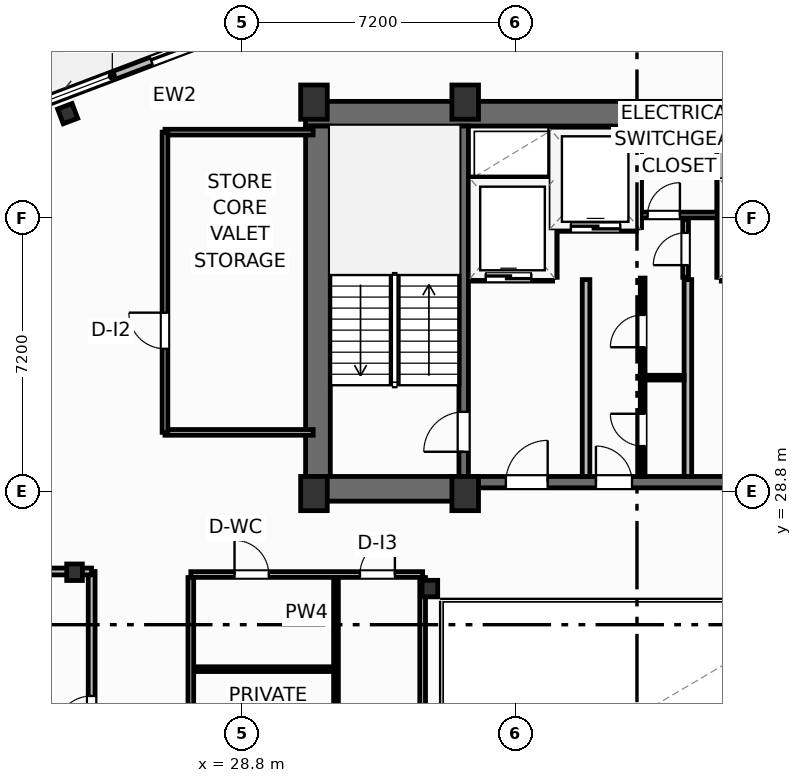
"""IFC4 building model, lengths in metres.
Left out: names, types, materials, properties, quantities, classifications, styles, units other than length and angle.
Written with IfcOpenShell. Run it as: python <this file> out.ifc"""

import sys

from ifc_helpers import new_model, si_unit, direction, frame, frame_2d, origin, origin_2d, place, context, subcontext, project, spatial, rectangle, i_section, extrude, element, fill, save


model = new_model("IFC4")
c1 = context("Model", 3, precision=1e-05, world=origin(), true_north=direction((0.0, 1.0)))
c2 = subcontext(c1, "Body", "Model", "MODEL_VIEW")
j1 = project(units=[si_unit("LENGTHUNIT", "METRE"), si_unit("PLANEANGLEUNIT", "RADIAN")], contexts=[c1])
p1 = place(None, origin())
s1 = spatial("IfcSite", under=j1, at=p1, CompositionType="ELEMENT")
p2 = place(p1, origin())
s2 = spatial("IfcBuilding", under=s1, at=p2, CompositionType="ELEMENT")
p3 = place(p2, frame((0.0, 0.0, 212.7)))
s3 = spatial("IfcBuildingStorey", under=s2, at=p3, CompositionType="ELEMENT", Elevation=212.7)
for number, where, z_axis, x_axis in (
    (1, (30.7, 28.75, 0.0), (0.0, 0.0, 1.0), (1.0, 0.0, 0.0)),
    (2, (34.68, 28.75, 0.0), (0.0, 0.0, 1.0), (1.0, 0.0, 0.0)),
    (3, (30.7, 39.05, 0.0), (0.0, 0.0, 1.0), (1.0, 0.0, 0.0)),
    (4, (34.68, 39.05, 0.0), (0.0, 0.0, 1.0), (1.0, 0.0, 0.0)),
):
    element("IfcColumn", number, at=place(p3, frame(where, z_axis=z_axis, x_axis=x_axis)), inside=s3, PredefinedType="COLUMN", context=c2, shape_type="SweptSolid", body=[
        extrude(rectangle(XDim=0.7, YDim=0.9, at=origin_2d()), origin(), (0.0, 0.0, 1.0), 3.7),
    ])
for number, where, z_axis, x_axis in (
    (5, (33.75, 26.25, 0.0), (0.0, 0.0, 1.0), (1.0, 0.0, 0.0)),
    (6, (24.4, 26.68, 0.0), (0.0, 0.0, 1.0), (1.0, 0.0, 0.0)),
):
    element("IfcColumn", number, at=place(p3, frame(where, z_axis=z_axis, x_axis=x_axis)), inside=s3, PredefinedType="COLUMN", context=c2, shape_type="SweptSolid", body=[
        extrude(i_section(OverallWidth=0.412, OverallDepth=0.435, WebThickness=0.036, FlangeThickness=0.057, FilletRadius=0.025, at=origin_2d()), origin(), (0.0, 0.0, 1.0), 3.7),
    ])
p4 = place(p3, frame((30.48, 38.745, 0.0), z_axis=(0.0, 0.0, 1.0), x_axis=(1.0, 0.0, 0.0)))
e7 = element("IfcWall", 7, at=p4, inside=s3, PredefinedType="SHEAR", context=c2, shape_type="SweptSolid", body=[
    extrude(rectangle(XDim=17.44, YDim=0.65, at=frame_2d((8.72, 0.0))), origin(), (0.0, 0.0, 1.0), 3.45),
])
p5 = place(p3, frame((30.805, 29.2, 0.0), z_axis=(0.0, 0.0, 1.0), x_axis=(0.0, 1.0, 0.0)))
e8 = element("IfcWall", 8, at=p5, inside=s3, PredefinedType="SHEAR", context=c2, shape_type="SweptSolid", body=[
    extrude(rectangle(XDim=9.22, YDim=0.65, at=frame_2d((4.61, 0.0))), origin(), (0.0, 0.0, 1.0), 3.45),
])
p6 = place(p3, frame((30.48, 28.875, 0.0), z_axis=(0.0, 0.0, 1.0), x_axis=(1.0, 0.0, 0.0)))
e9 = element("IfcWall", 9, at=p6, inside=s3, PredefinedType="SHEAR", context=c2, shape_type="SweptSolid", body=[
    extrude(rectangle(XDim=4.32, YDim=0.65, at=frame_2d((2.16, 0.0))), origin(), (0.0, 0.0, 1.0), 3.45),
])
p7 = place(p3, frame((34.8, 29.05, 0.0), z_axis=(0.0, 0.0, 1.0), x_axis=(1.0, 0.0, 0.0)))
e10 = element("IfcWall", 10, at=p7, inside=s3, PredefinedType="SHEAR", context=c2, shape_type="SweptSolid", body=[
    extrude(rectangle(XDim=8.8, YDim=0.3, at=frame_2d((4.4, 0.0))), origin(), (0.0, 0.0, 1.0), 3.45),
])
p8 = place(p7, frame((0.95, 0.0, 0.0)))
e11 = element("IfcOpeningElement", 11, at=p8, cuts=e10, PredefinedType="OPENING", context=c2, shape_type="SweptSolid", body=[
    extrude(rectangle(XDim=1.1, YDim=2.15, at=frame_2d((0.55, 1.075))), frame((0.0, 0.16, 0.0), z_axis=(0.0, -1.0, 0.0), x_axis=(1.0, 0.0, 0.0)), (0.0, 0.0, 1.0), 0.32),
])
p9 = place(p7, frame((6.75, 0.0, 0.0)))
e12 = element("IfcOpeningElement", 12, at=p9, cuts=e10, PredefinedType="OPENING", context=c2, shape_type="SweptSolid", body=[
    extrude(rectangle(XDim=1.1, YDim=2.15, at=frame_2d((0.55, 1.075))), frame((0.0, 0.16, 0.0), z_axis=(0.0, -1.0, 0.0), x_axis=(1.0, 0.0, 0.0)), (0.0, 0.0, 1.0), 0.32),
])
p10 = place(p7, frame((3.32, 0.0, 0.0)))
e13 = element("IfcOpeningElement", 13, at=p10, cuts=e10, PredefinedType="OPENING", context=c2, shape_type="SweptSolid", body=[
    extrude(rectangle(XDim=0.95, YDim=2.15, at=frame_2d((0.475, 1.075))), frame((0.0, 0.16, 0.0), z_axis=(0.0, -1.0, 0.0), x_axis=(1.0, 0.0, 0.0)), (0.0, 0.0, 1.0), 0.32),
])
p11 = place(p3, frame((34.64, 29.2, 0.0), z_axis=(0.0, 0.0, 1.0), x_axis=(0.0, 1.0, 0.0)))
e14 = element("IfcWall", 14, at=p11, inside=s3, PredefinedType="SHEAR", context=c2, shape_type="SweptSolid", body=[
    extrude(rectangle(XDim=9.22, YDim=0.25, at=frame_2d((4.61, 0.0))), origin(), (0.0, 0.0, 1.0), 3.45),
])
p12 = place(p11, frame((0.65, 0.0, 0.0)))
e15 = element("IfcOpeningElement", 15, at=p12, cuts=e14, PredefinedType="OPENING", context=c2, shape_type="SweptSolid", body=[
    extrude(rectangle(XDim=1.05, YDim=2.15, at=frame_2d((0.525, 1.075))), frame((0.0, 0.135, 0.0), z_axis=(0.0, -1.0, 0.0), x_axis=(1.0, 0.0, 0.0)), (0.0, 0.0, 1.0), 0.27),
])
p13 = place(p3, frame((24.219, 38.747, 0.0), z_axis=(0.0, 0.0, 1.0), x_axis=(0.935221751401, 0.354062530786, 0.0)))
e16 = element("IfcColumn", 16, at=p13, inside=s3, PredefinedType="COLUMN", context=c2, shape_type="SweptSolid", body=[
    extrude(i_section(OverallWidth=0.406, OverallDepth=0.416, WebThickness=0.03, FlangeThickness=0.048, FilletRadius=0.025, at=origin_2d()), origin(), (0.0, 0.0, 1.0), 3.7),
])
p14 = place(p3, frame((23.149, 38.887, 0.0), z_axis=(0.0, 0.0, 1.0), x_axis=(0.9352192676, 0.354069091436, 0.0)))
e17 = element("IfcWall", 17, at=p14, inside=s3, PredefinedType="SOLIDWALL", context=c2, shape_type="SweptSolid", body=[
    extrude(rectangle(XDim=6.0, YDim=0.22, at=frame_2d((3.0, 0.0))), origin(), (0.0, 0.0, 1.0), 2.73),
])
p15 = place(p14, frame((3.5, 0.0, 0.0)))
e18 = element("IfcOpeningElement", 18, at=p15, cuts=e17, PredefinedType="OPENING", context=c2, shape_type="SweptSolid", body=[
    extrude(rectangle(XDim=2.1, YDim=2.3, at=frame_2d((1.05, 1.15))), frame((0.0, 0.12, 0.0), z_axis=(0.0, -1.0, 0.0), x_axis=(1.0, 0.0, 0.0)), (0.0, 0.0, 1.0), 0.24),
])
p16 = place(p14, frame((0.55, 0.0, 0.75)))
e19 = element("IfcOpeningElement", 19, at=p16, cuts=e17, PredefinedType="OPENING", context=c2, shape_type="SweptSolid", body=[
    extrude(rectangle(XDim=1.85, YDim=1.75, at=frame_2d((0.925, 0.875))), frame((0.0, 0.12, 0.0), z_axis=(0.0, -1.0, 0.0), x_axis=(1.0, 0.0, 0.0)), (0.0, 0.0, 1.0), 0.24),
])
p17 = place(p3, frame((24.85, 19.2, 0.0), z_axis=(0.0, 0.0, 1.0), x_axis=(0.0, 1.0, 0.0)))
e20 = element("IfcWall", 20, at=p17, inside=s3, PredefinedType="PARTITIONING", context=c2, shape_type="SweptSolid", body=[
    extrude(rectangle(XDim=7.5, YDim=0.18, at=frame_2d((3.75, 0.0))), origin(), (0.0, 0.0, 1.0), 3.45),
])
p18 = place(p17, frame((3.275, 0.0, 0.0)))
e21 = element("IfcOpeningElement", 21, at=p18, cuts=e20, PredefinedType="OPENING", context=c2, shape_type="SweptSolid", body=[
    extrude(rectangle(XDim=0.95, YDim=2.05, at=frame_2d((0.475, 1.025))), frame((0.0, 0.1, 0.0), z_axis=(0.0, -1.0, 0.0), x_axis=(1.0, 0.0, 0.0)), (0.0, 0.0, 1.0), 0.2),
])
p19 = place(p3, frame((3.467, 26.7, 0.0), z_axis=(0.0, 0.0, 1.0), x_axis=(1.0, 0.0, 0.0)))
e22 = element("IfcWall", 22, at=p19, inside=s3, PredefinedType="PARTITIONING", context=c2, shape_type="SweptSolid", body=[
    extrude(rectangle(XDim=21.383, YDim=0.18, at=frame_2d((10.691, 0.0))), origin(), (0.0, 0.0, 1.0), 2.662),
])
for number, where, z_axis, x_axis in (
    (23, (37.86, 29.2, 0.0), (0.0, 0.0, 1.0), (0.0, 1.0, 0.0)),
    (24, (40.54, 29.2, 0.0), (0.0, 0.0, 1.0), (0.0, 1.0, 0.0)),
):
    element("IfcWall", number, at=place(p3, frame(where, z_axis=z_axis, x_axis=x_axis)), inside=s3, PredefinedType="PARTITIONING", context=c2, shape_type="SweptSolid", body=[
        extrude(rectangle(XDim=5.18, YDim=0.2, at=frame_2d((2.59, 0.0))), origin(), (0.0, 0.0, 1.0), 3.45),
    ])
p20 = place(p3, frame((34.8, 34.44, 0.0), z_axis=(0.0, 0.0, 1.0), x_axis=(1.0, 0.0, 0.0)))
e25 = element("IfcWall", 25, at=p20, inside=s3, PredefinedType="PARTITIONING", context=c2, shape_type="SweptSolid", body=[
    extrude(rectangle(XDim=2.18, YDim=0.2, at=frame_2d((1.09, 0.0))), origin(), (0.0, 0.0, 1.0), 3.45),
])
p21 = place(p20, frame((0.42, 0.0, 0.0)))
e26 = element("IfcOpeningElement", 26, at=p21, cuts=e25, PredefinedType="OPENING", context=c2, shape_type="SweptSolid", body=[
    extrude(rectangle(XDim=1.2, YDim=2.2, at=frame_2d((0.6, 1.1))), frame((0.0, 0.11, 0.0), z_axis=(0.0, -1.0, 0.0), x_axis=(1.0, 0.0, 0.0)), (0.0, 0.0, 1.0), 0.22),
])
p22 = place(p3, frame((34.8, 36.98, 0.0), z_axis=(0.0, 0.0, 1.0), x_axis=(1.0, 0.0, 0.0)))
e27 = element("IfcWall", 27, at=p22, inside=s3, PredefinedType="PARTITIONING", context=c2, shape_type="SweptSolid", body=[
    extrude(rectangle(XDim=2.18, YDim=0.2, at=frame_2d((1.09, 0.0))), origin(), (0.0, 0.0, 1.0), 3.45),
])
for number, where, z_axis, x_axis in (
    (28, (37.0, 34.44, 0.0), (0.0, 0.0, 1.0), (0.0, 1.0, 0.0)),
    (29, (41.4, 34.44, 0.0), (0.0, 0.0, 1.0), (0.0, 1.0, 0.0)),
):
    element("IfcWall", number, at=place(p3, frame(where, z_axis=z_axis, x_axis=x_axis)), inside=s3, PredefinedType="PARTITIONING", context=c2, shape_type="SweptSolid", body=[
        extrude(rectangle(XDim=3.9, YDim=0.2, at=frame_2d((1.95, 0.0))), origin(), (0.0, 0.0, 1.0), 3.45),
    ])
p23 = place(p3, frame((37.06, 35.75, 0.0), z_axis=(0.0, 0.0, 1.0), x_axis=(1.0, 0.0, 0.0)))
e30 = element("IfcWall", 30, at=p23, inside=s3, PredefinedType="PARTITIONING", context=c2, shape_type="SweptSolid", body=[
    extrude(rectangle(XDim=2.12, YDim=0.2, at=frame_2d((1.06, 0.0))), origin(), (0.0, 0.0, 1.0), 3.45),
])
p24 = place(p23, frame((0.4, 0.0, 0.0)))
e31 = element("IfcOpeningElement", 31, at=p24, cuts=e30, PredefinedType="OPENING", context=c2, shape_type="SweptSolid", body=[
    extrude(rectangle(XDim=1.3, YDim=2.2, at=frame_2d((0.65, 1.1))), frame((0.0, 0.11, 0.0), z_axis=(0.0, -1.0, 0.0), x_axis=(1.0, 0.0, 0.0)), (0.0, 0.0, 1.0), 0.22),
])
p25 = place(p3, frame((39.22, 35.75, 0.0), z_axis=(0.0, 0.0, 1.0), x_axis=(0.0, 1.0, 0.0)))
e32 = element("IfcWall", 32, at=p25, inside=s3, PredefinedType="PARTITIONING", context=c2, shape_type="SweptSolid", body=[
    extrude(rectangle(XDim=2.59, YDim=0.2, at=frame_2d((1.295, 0.0))), origin(), (0.0, 0.0, 1.0), 3.45),
])
p26 = place(p3, frame((39.3, 36.08, 0.0), z_axis=(0.0, 0.0, 1.0), x_axis=(1.0, 0.0, 0.0)))
e33 = element("IfcWall", 33, at=p26, inside=s3, PredefinedType="PARTITIONING", context=c2, shape_type="SweptSolid", body=[
    extrude(rectangle(XDim=2.02, YDim=0.15, at=frame_2d((1.01, 0.0))), origin(), (0.0, 0.0, 1.0), 3.45),
])
p27 = place(p26, frame((0.18, 0.0, 0.0)))
e34 = element("IfcOpeningElement", 34, at=p27, cuts=e33, PredefinedType="OPENING", context=c2, shape_type="SweptSolid", body=[
    extrude(rectangle(XDim=0.85, YDim=2.05, at=frame_2d((0.425, 1.025))), frame((0.0, 0.085, 0.0), z_axis=(0.0, -1.0, 0.0), x_axis=(1.0, 0.0, 0.0)), (0.0, 0.0, 1.0), 0.17),
])
p28 = place(p3, frame((40.48, 34.44, 0.0), z_axis=(0.0, 0.0, 1.0), x_axis=(0.0, 1.0, 0.0)))
e35 = element("IfcWall", 35, at=p28, inside=s3, PredefinedType="PARTITIONING", context=c2, shape_type="SweptSolid", body=[
    extrude(rectangle(XDim=1.52, YDim=0.15, at=frame_2d((0.76, 0.0))), origin(), (0.0, 0.0, 1.0), 3.45),
])
p29 = place(p28, frame((0.32, 0.0, 0.0)))
e36 = element("IfcOpeningElement", 36, at=p29, cuts=e35, PredefinedType="OPENING", context=c2, shape_type="SweptSolid", body=[
    extrude(rectangle(XDim=0.85, YDim=2.05, at=frame_2d((0.425, 1.025))), frame((0.0, 0.085, 0.0), z_axis=(0.0, -1.0, 0.0), x_axis=(1.0, 0.0, 0.0)), (0.0, 0.0, 1.0), 0.17),
])
p30 = place(p3, frame((39.35, 31.8, 0.0), z_axis=(0.0, 0.0, 1.0), x_axis=(1.0, 0.0, 0.0)))
e37 = element("IfcWall", 37, at=p30, inside=s3, PredefinedType="PARTITIONING", context=c2, shape_type="SweptSolid", body=[
    extrude(rectangle(XDim=1.09, YDim=0.125, at=frame_2d((0.545, 0.0))), origin(), (0.0, 0.0, 1.0), 3.45),
])
p31 = place(p3, frame((39.35, 29.2, 0.0), z_axis=(0.0, 0.0, 1.0), x_axis=(0.0, 1.0, 0.0)))
e38 = element("IfcWall", 38, at=p31, inside=s3, PredefinedType="PARTITIONING", context=c2, shape_type="SweptSolid", body=[
    extrude(rectangle(XDim=5.22, YDim=0.125, at=frame_2d((2.61, 0.0))), origin(), (0.0, 0.0, 1.0), 3.45),
])
p32 = place(p31, frame((0.8, 0.0, 0.0)))
e39 = element("IfcOpeningElement", 39, at=p32, cuts=e38, PredefinedType="OPENING", context=c2, shape_type="SweptSolid", body=[
    extrude(rectangle(XDim=0.85, YDim=2.05, at=frame_2d((0.425, 1.025))), frame((0.0, 0.073, 0.0), z_axis=(0.0, -1.0, 0.0), x_axis=(1.0, 0.0, 0.0)), (0.0, 0.0, 1.0), 0.145),
])
p33 = place(p31, frame((3.4, 0.0, 0.0)))
e40 = element("IfcOpeningElement", 40, at=p33, cuts=e38, PredefinedType="OPENING", context=c2, shape_type="SweptSolid", body=[
    extrude(rectangle(XDim=0.85, YDim=2.05, at=frame_2d((0.425, 1.025))), frame((0.0, 0.073, 0.0), z_axis=(0.0, -1.0, 0.0), x_axis=(1.0, 0.0, 0.0)), (0.0, 0.0, 1.0), 0.145),
])
p34 = place(p3, frame((27.46, 26.62, 0.0), z_axis=(0.0, 0.0, 1.0), x_axis=(1.0, 0.0, 0.0)))
e41 = element("IfcWall", 41, at=p34, inside=s3, PredefinedType="PARTITIONING", context=c2, shape_type="SweptSolid", body=[
    extrude(rectangle(XDim=6.1, YDim=0.15, at=frame_2d((3.05, 0.0))), origin(), (0.0, 0.0, 1.0), 2.662),
])
p35 = place(p34, frame((1.15, 0.0, 0.0)))
e42 = element("IfcOpeningElement", 42, at=p35, cuts=e41, PredefinedType="OPENING", context=c2, shape_type="SweptSolid", body=[
    extrude(rectangle(XDim=0.9, YDim=2.05, at=frame_2d((0.45, 1.025))), frame((0.0, 0.085, 0.0), z_axis=(0.0, -1.0, 0.0), x_axis=(1.0, 0.0, 0.0)), (0.0, 0.0, 1.0), 0.17),
])
p36 = place(p34, frame((4.45, 0.0, 0.0)))
e43 = element("IfcOpeningElement", 43, at=p36, cuts=e41, PredefinedType="OPENING", context=c2, shape_type="SweptSolid", body=[
    extrude(rectangle(XDim=0.92, YDim=2.05, at=frame_2d((0.46, 1.025))), frame((0.0, 0.085, 0.0), z_axis=(0.0, -1.0, 0.0), x_axis=(1.0, 0.0, 0.0)), (0.0, 0.0, 1.0), 0.17),
])
p37 = place(p3, frame((31.28, 19.38, 0.0), z_axis=(0.0, 0.0, 1.0), x_axis=(0.0, 1.0, 0.0)))
e44 = element("IfcWall", 44, at=p37, inside=s3, PredefinedType="PARTITIONING", context=c2, shape_type="SweptSolid", body=[
    extrude(rectangle(XDim=7.16, YDim=0.125, at=frame_2d((3.58, 0.0))), origin(), (0.0, 0.0, 1.0), 3.45),
])
p38 = place(p3, frame((27.52, 24.13, 0.0), z_axis=(0.0, 0.0, 1.0), x_axis=(1.0, 0.0, 0.0)))
e45 = element("IfcWall", 45, at=p38, inside=s3, PredefinedType="PARTITIONING", context=c2, shape_type="SweptSolid", body=[
    extrude(rectangle(XDim=3.7, YDim=0.125, at=frame_2d((1.85, 0.0))), origin(), (0.0, 0.0, 1.0), 3.45),
])
p39 = place(p3, frame((27.46, 19.38, 0.0), z_axis=(0.0, 0.0, 1.0), x_axis=(0.0, 1.0, 0.0)))
e46 = element("IfcWall", 46, at=p39, inside=s3, PredefinedType="PARTITIONING", context=c2, shape_type="SweptSolid", body=[
    extrude(rectangle(XDim=7.16, YDim=0.15, at=frame_2d((3.58, 0.0))), origin(), (0.0, 0.0, 1.0), 3.45),
])
p40 = place(p39, frame((1.4, 0.0, 0.0)))
e47 = element("IfcOpeningElement", 47, at=p40, cuts=e46, PredefinedType="OPENING", context=c2, shape_type="SweptSolid", body=[
    extrude(rectangle(XDim=0.95, YDim=2.05, at=frame_2d((0.475, 1.025))), frame((0.0, 0.085, 0.0), z_axis=(0.0, -1.0, 0.0), x_axis=(1.0, 0.0, 0.0)), (0.0, 0.0, 1.0), 0.17),
])
p41 = place(p3, frame((33.56, 19.38, 0.0), z_axis=(0.0, 0.0, 1.0), x_axis=(0.0, 1.0, 0.0)))
e48 = element("IfcWall", 48, at=p41, inside=s3, PredefinedType="PARTITIONING", context=c2, shape_type="SweptSolid", body=[
    extrude(rectangle(XDim=7.16, YDim=0.15, at=frame_2d((3.58, 0.0))), origin(), (0.0, 0.0, 1.0), 2.824),
])
for number, where, z_axis, x_axis in (
    (49, (26.78, 30.36, 0.0), (0.0, 0.0, 1.0), (1.0, 0.0, 0.0)),
    (50, (26.78, 38.26, 0.0), (0.0, 0.0, 1.0), (1.0, 0.0, 0.0)),
):
    element("IfcWall", number, at=place(p3, frame(where, z_axis=z_axis, x_axis=x_axis)), inside=s3, PredefinedType="PARTITIONING", context=c2, shape_type="SweptSolid", body=[
        extrude(rectangle(XDim=3.9, YDim=0.15, at=frame_2d((1.95, 0.0))), origin(), (0.0, 0.0, 1.0), 3.45),
    ])
p42 = place(p3, frame((26.78, 30.36, 0.0), z_axis=(0.0, 0.0, 1.0), x_axis=(0.0, 1.0, 0.0)))
e51 = element("IfcWall", 51, at=p42, inside=s3, PredefinedType="PARTITIONING", context=c2, shape_type="SweptSolid", body=[
    extrude(rectangle(XDim=7.9, YDim=0.15, at=frame_2d((3.95, 0.0))), origin(), (0.0, 0.0, 1.0), 3.45),
])
p43 = place(p42, frame((2.2, 0.0, 0.0)))
e52 = element("IfcOpeningElement", 52, at=p43, cuts=e51, PredefinedType="OPENING", context=c2, shape_type="SweptSolid", body=[
    extrude(rectangle(XDim=0.95, YDim=2.05, at=frame_2d((0.475, 1.025))), frame((0.0, 0.085, 0.0), z_axis=(0.0, -1.0, 0.0), x_axis=(1.0, 0.0, 0.0)), (0.0, 0.0, 1.0), 0.17),
])
p44 = place(p15, origin())
e53 = element("IfcDoor", 53, at=p44, inside=s3, OperationType="SLIDING_TO_LEFT", PredefinedType="DOOR", context=c2, shape_type="SweptSolid", body=[
    extrude(rectangle(XDim=2.1, YDim=2.3, at=frame_2d((1.05, 1.15))), frame((0.0, 0.025, 0.0), z_axis=(0.0, -1.0, 0.0), x_axis=(1.0, 0.0, 0.0)), (0.0, 0.0, 1.0), 0.05),
])
fill(e18, e53)
p45 = place(p16, origin())
e54 = element("IfcWindow", 54, at=p45, inside=s3, PartitioningType="SINGLE_PANEL", PredefinedType="WINDOW", context=c2, shape_type="SweptSolid", body=[
    extrude(rectangle(XDim=1.85, YDim=1.75, at=frame_2d((0.925, 0.875))), frame((0.0, 0.03, 0.0), z_axis=(0.0, -1.0, 0.0), x_axis=(1.0, 0.0, 0.0)), (0.0, 0.0, 1.0), 0.06),
])
fill(e19, e54)
p46 = place(p18, origin())
e55 = element("IfcDoor", 55, at=p46, inside=s3, OperationType="SINGLE_SWING_LEFT", PredefinedType="DOOR", context=c2, shape_type="SweptSolid", body=[
    extrude(rectangle(XDim=0.95, YDim=2.05, at=frame_2d((0.475, 1.025))), frame((0.0, 0.025, 0.0), z_axis=(0.0, -1.0, 0.0), x_axis=(1.0, 0.0, 0.0)), (0.0, 0.0, 1.0), 0.05),
])
fill(e21, e55)
p47 = place(p12, origin())
e56 = element("IfcDoor", 56, at=p47, inside=s3, OperationType="SINGLE_SWING_LEFT", PredefinedType="DOOR", context=c2, shape_type="SweptSolid", body=[
    extrude(rectangle(XDim=1.05, YDim=2.15, at=frame_2d((0.525, 1.075))), frame((0.0, 0.025, 0.0), z_axis=(0.0, -1.0, 0.0), x_axis=(1.0, 0.0, 0.0)), (0.0, 0.0, 1.0), 0.05),
])
fill(e15, e56)
p48 = place(p8, origin())
e57 = element("IfcDoor", 57, at=p48, inside=s3, OperationType="SINGLE_SWING_RIGHT", PredefinedType="DOOR", context=c2, shape_type="SweptSolid", body=[
    extrude(rectangle(XDim=1.1, YDim=2.15, at=frame_2d((0.55, 1.075))), frame((0.0, 0.025, 0.0), z_axis=(0.0, -1.0, 0.0), x_axis=(1.0, 0.0, 0.0)), (0.0, 0.0, 1.0), 0.05),
])
fill(e11, e57)
p49 = place(p21, origin())
e58 = element("IfcDoor", 58, at=p49, inside=s3, OperationType="SLIDING_TO_LEFT", PredefinedType="DOOR", context=c2, shape_type="SweptSolid", body=[
    extrude(rectangle(XDim=1.2, YDim=2.2, at=frame_2d((0.6, 1.1))), frame((0.0, 0.025, 0.0), z_axis=(0.0, -1.0, 0.0), x_axis=(1.0, 0.0, 0.0)), (0.0, 0.0, 1.0), 0.05),
])
fill(e26, e58)
p50 = place(p24, origin())
e59 = element("IfcDoor", 59, at=p50, inside=s3, OperationType="SLIDING_TO_LEFT", PredefinedType="DOOR", context=c2, shape_type="SweptSolid", body=[
    extrude(rectangle(XDim=1.3, YDim=2.2, at=frame_2d((0.65, 1.1))), frame((0.0, 0.025, 0.0), z_axis=(0.0, -1.0, 0.0), x_axis=(1.0, 0.0, 0.0)), (0.0, 0.0, 1.0), 0.05),
])
fill(e31, e59)
p51 = place(p27, origin())
e60 = element("IfcDoor", 60, at=p51, inside=s3, OperationType="SINGLE_SWING_RIGHT", PredefinedType="DOOR", context=c2, shape_type="SweptSolid", body=[
    extrude(rectangle(XDim=0.85, YDim=2.05, at=frame_2d((0.425, 1.025))), frame((0.0, 0.025, 0.0), z_axis=(0.0, -1.0, 0.0), x_axis=(1.0, 0.0, 0.0)), (0.0, 0.0, 1.0), 0.05),
])
fill(e34, e60)
p52 = place(p29, origin())
e61 = element("IfcDoor", 61, at=p52, inside=s3, OperationType="SINGLE_SWING_LEFT", PredefinedType="DOOR", context=c2, shape_type="SweptSolid", body=[
    extrude(rectangle(XDim=0.85, YDim=2.05, at=frame_2d((0.425, 1.025))), frame((0.0, 0.025, 0.0), z_axis=(0.0, -1.0, 0.0), x_axis=(1.0, 0.0, 0.0)), (0.0, 0.0, 1.0), 0.05),
])
fill(e36, e61)
p53 = place(p32, origin())
e62 = element("IfcDoor", 62, at=p53, inside=s3, OperationType="SINGLE_SWING_RIGHT", PredefinedType="DOOR", context=c2, shape_type="SweptSolid", body=[
    extrude(rectangle(XDim=0.85, YDim=2.05, at=frame_2d((0.425, 1.025))), frame((0.0, 0.025, 0.0), z_axis=(0.0, -1.0, 0.0), x_axis=(1.0, 0.0, 0.0)), (0.0, 0.0, 1.0), 0.05),
])
fill(e39, e62)
p54 = place(p33, origin())
e63 = element("IfcDoor", 63, at=p54, inside=s3, OperationType="SINGLE_SWING_LEFT", PredefinedType="DOOR", context=c2, shape_type="SweptSolid", body=[
    extrude(rectangle(XDim=0.85, YDim=2.05, at=frame_2d((0.425, 1.025))), frame((0.0, 0.025, 0.0), z_axis=(0.0, -1.0, 0.0), x_axis=(1.0, 0.0, 0.0)), (0.0, 0.0, 1.0), 0.05),
])
fill(e40, e63)
p55 = place(p10, origin())
e64 = element("IfcDoor", 64, at=p55, inside=s3, OperationType="SINGLE_SWING_LEFT", PredefinedType="DOOR", context=c2, shape_type="SweptSolid", body=[
    extrude(rectangle(XDim=0.95, YDim=2.15, at=frame_2d((0.475, 1.075))), frame((0.0, 0.025, 0.0), z_axis=(0.0, -1.0, 0.0), x_axis=(1.0, 0.0, 0.0)), (0.0, 0.0, 1.0), 0.05),
])
fill(e13, e64)
p56 = place(p35, origin())
e65 = element("IfcDoor", 65, at=p56, inside=s3, OperationType="SINGLE_SWING_LEFT", PredefinedType="DOOR", context=c2, shape_type="SweptSolid", body=[
    extrude(rectangle(XDim=0.9, YDim=2.05, at=frame_2d((0.45, 1.025))), frame((0.0, 0.025, 0.0), z_axis=(0.0, -1.0, 0.0), x_axis=(1.0, 0.0, 0.0)), (0.0, 0.0, 1.0), 0.05),
])
fill(e42, e65)
p57 = place(p36, origin())
e66 = element("IfcDoor", 66, at=p57, inside=s3, OperationType="SINGLE_SWING_RIGHT", PredefinedType="DOOR", context=c2, shape_type="SweptSolid", body=[
    extrude(rectangle(XDim=0.92, YDim=2.05, at=frame_2d((0.46, 1.025))), frame((0.0, 0.025, 0.0), z_axis=(0.0, -1.0, 0.0), x_axis=(1.0, 0.0, 0.0)), (0.0, 0.0, 1.0), 0.05),
])
fill(e43, e66)
p58 = place(p43, origin())
e67 = element("IfcDoor", 67, at=p58, inside=s3, OperationType="SINGLE_SWING_RIGHT", PredefinedType="DOOR", context=c2, shape_type="SweptSolid", body=[
    extrude(rectangle(XDim=0.95, YDim=2.05, at=frame_2d((0.475, 1.025))), frame((0.0, 0.025, 0.0), z_axis=(0.0, -1.0, 0.0), x_axis=(1.0, 0.0, 0.0)), (0.0, 0.0, 1.0), 0.05),
])
fill(e52, e67)
save(model, sys.argv[1])
